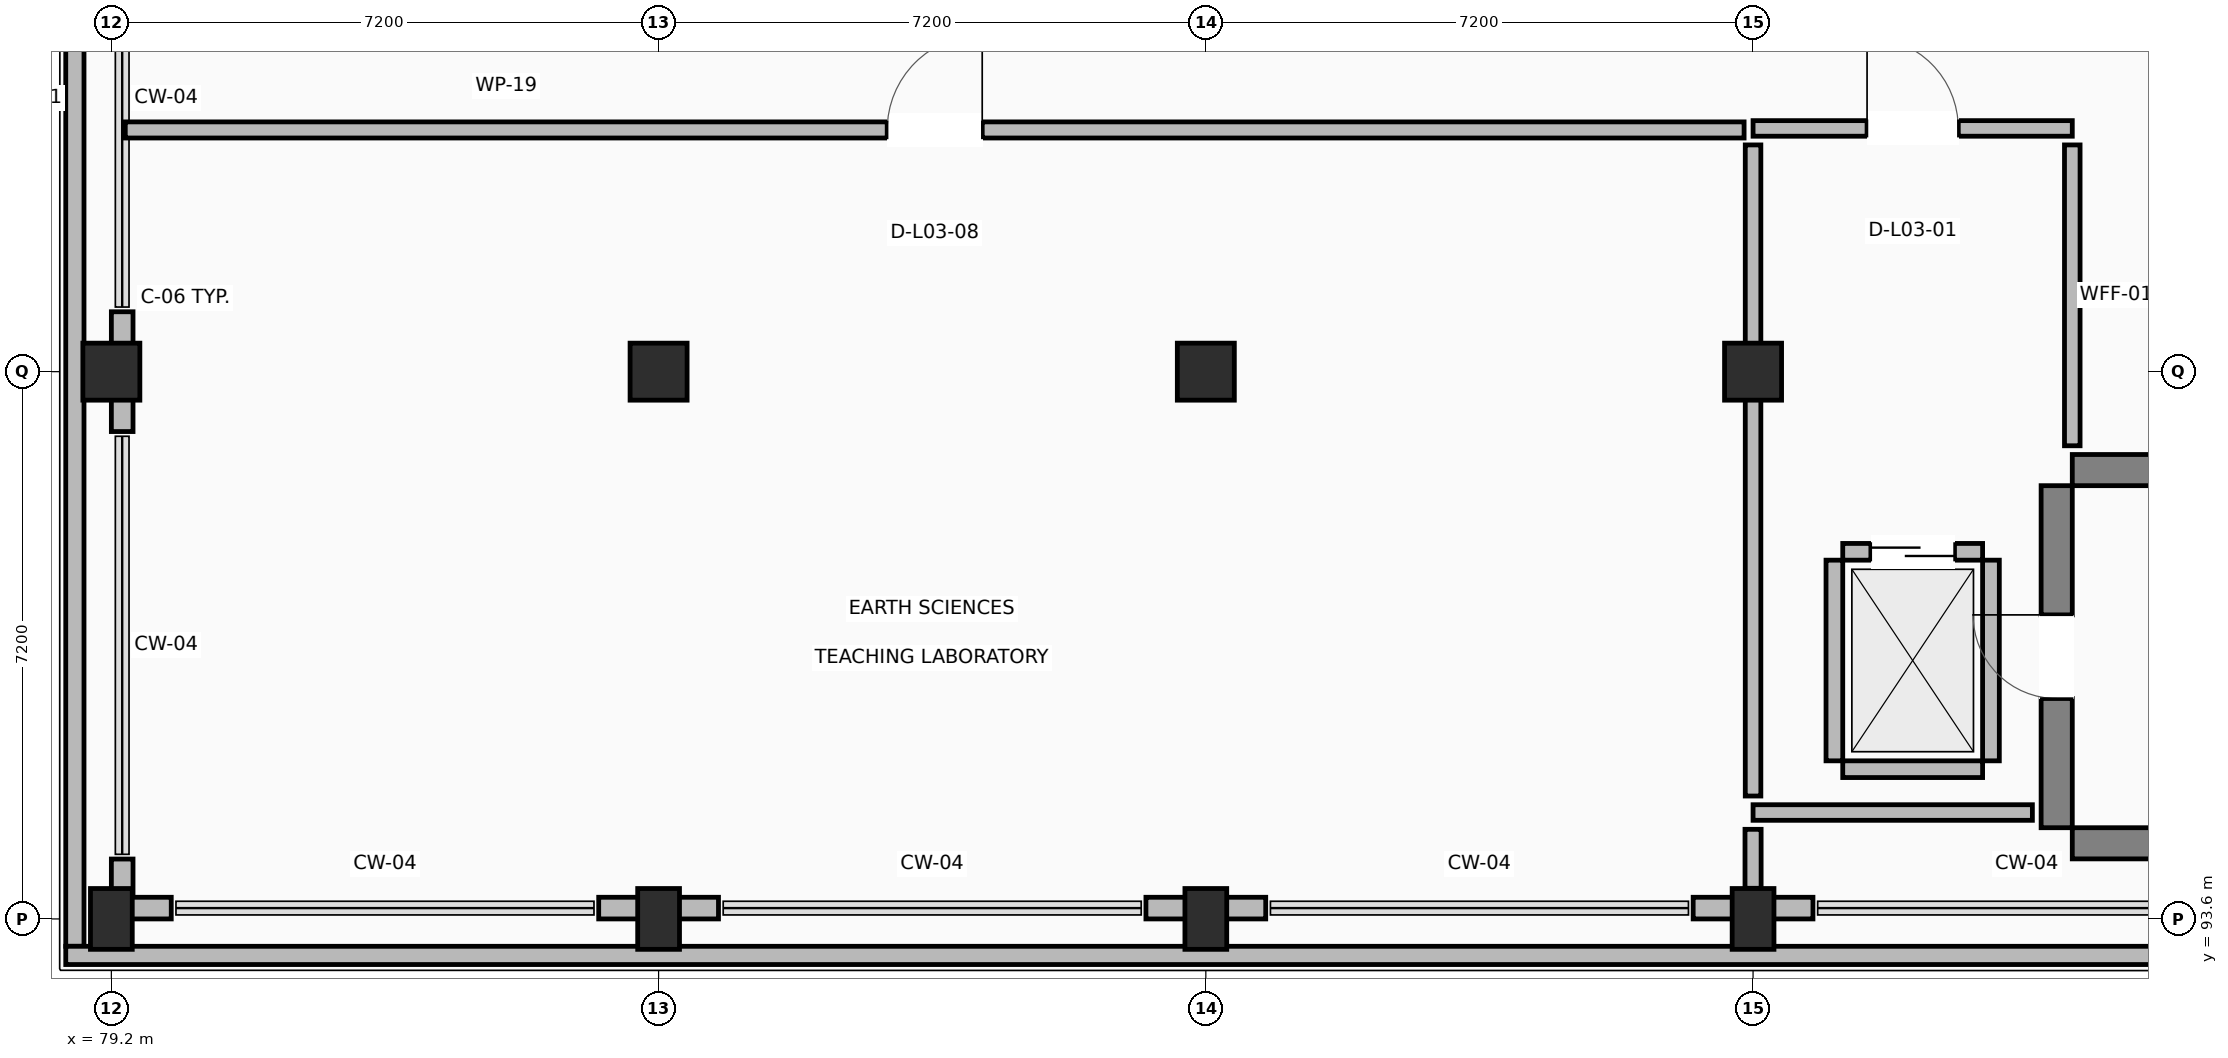
"""IFC4 building model, lengths in metres.
Left out: names, types, materials, properties, quantities, classifications, styles, units other than length and angle.
Written with IfcOpenShell. Run it as: python <this file> out.ifc"""

import sys

from ifc_helpers import new_model, si_unit, direction, frame, frame_2d, origin, origin_2d, place, context, subcontext, project, spatial, rectangle, extrude, element, fill, save


model = new_model("IFC4")
c1 = context("Model", 3, precision=1e-05, world=origin(), true_north=direction((0.0, 1.0)))
c2 = subcontext(c1, "Body", "Model", "MODEL_VIEW")
j1 = project(units=[si_unit("LENGTHUNIT", "METRE"), si_unit("PLANEANGLEUNIT", "RADIAN")], contexts=[c1])
p1 = place(None, origin())
s1 = spatial("IfcSite", under=j1, at=p1, CompositionType="ELEMENT")
p2 = place(p1, origin())
s2 = spatial("IfcBuilding", under=s1, at=p2, CompositionType="ELEMENT")
p3 = place(p2, frame((0.0, 0.0, 13.5)))
s3 = spatial("IfcBuildingStorey", under=s2, at=p3, CompositionType="ELEMENT", Elevation=13.5)
p4 = place(p3, frame((79.2, 93.6, 0.0), z_axis=(0.0, 0.0, 1.0), x_axis=(1.0, 0.0, 0.0)))
e1 = element("IfcColumn", 1, at=p4, inside=s3, PredefinedType="COLUMN", context=c2, shape_type="SweptSolid", body=[
    extrude(rectangle(XDim=0.55, YDim=0.8, at=origin_2d()), origin(), (0.0, 0.0, 1.0), 4.22),
])
p5 = place(p3, frame((79.2, 100.8, 0.0), z_axis=(0.0, 0.0, 1.0), x_axis=(1.0, 0.0, 0.0)))
e2 = element("IfcColumn", 2, at=p5, inside=s3, PredefinedType="COLUMN", context=c2, shape_type="SweptSolid", body=[
    extrude(rectangle(XDim=0.75, YDim=0.75, at=origin_2d()), origin(), (0.0, 0.0, 1.0), 4.22),
])
p6 = place(p3, frame((86.4, 93.6, 0.0), z_axis=(0.0, 0.0, 1.0), x_axis=(1.0, 0.0, 0.0)))
e3 = element("IfcColumn", 3, at=p6, inside=s3, PredefinedType="COLUMN", context=c2, shape_type="SweptSolid", body=[
    extrude(rectangle(XDim=0.55, YDim=0.8, at=origin_2d()), origin(), (0.0, 0.0, 1.0), 4.22),
])
p7 = place(p3, frame((86.4, 100.8, 0.0), z_axis=(0.0, 0.0, 1.0), x_axis=(1.0, 0.0, 0.0)))
e4 = element("IfcColumn", 4, at=p7, inside=s3, PredefinedType="COLUMN", context=c2, shape_type="SweptSolid", body=[
    extrude(rectangle(XDim=0.75, YDim=0.75, at=origin_2d()), origin(), (0.0, 0.0, 1.0), 4.22),
])
p8 = place(p3, frame((93.6, 93.6, 0.0), z_axis=(0.0, 0.0, 1.0), x_axis=(1.0, 0.0, 0.0)))
e5 = element("IfcColumn", 5, at=p8, inside=s3, PredefinedType="COLUMN", context=c2, shape_type="SweptSolid", body=[
    extrude(rectangle(XDim=0.55, YDim=0.8, at=origin_2d()), origin(), (0.0, 0.0, 1.0), 4.22),
])
p9 = place(p3, frame((93.6, 100.8, 0.0), z_axis=(0.0, 0.0, 1.0), x_axis=(1.0, 0.0, 0.0)))
e6 = element("IfcColumn", 6, at=p9, inside=s3, PredefinedType="COLUMN", context=c2, shape_type="SweptSolid", body=[
    extrude(rectangle(XDim=0.75, YDim=0.75, at=origin_2d()), origin(), (0.0, 0.0, 1.0), 4.22),
])
p10 = place(p3, frame((100.8, 93.6, 0.0), z_axis=(0.0, 0.0, 1.0), x_axis=(1.0, 0.0, 0.0)))
e7 = element("IfcColumn", 7, at=p10, inside=s3, PredefinedType="COLUMN", context=c2, shape_type="SweptSolid", body=[
    extrude(rectangle(XDim=0.55, YDim=0.8, at=origin_2d()), origin(), (0.0, 0.0, 1.0), 4.22),
])
p11 = place(p3, frame((100.8, 100.8, 0.0), z_axis=(0.0, 0.0, 1.0), x_axis=(1.0, 0.0, 0.0)))
e8 = element("IfcColumn", 8, at=p11, inside=s3, PredefinedType="COLUMN", context=c2, shape_type="SweptSolid", body=[
    extrude(rectangle(XDim=0.75, YDim=0.75, at=origin_2d()), origin(), (0.0, 0.0, 1.0), 4.22),
])
for number, where, z_axis, x_axis in (
    (9, (105.0, 94.595, 0.0), (0.0, 0.0, 1.0), (1.0, 0.0, 0.0)),
    (10, (105.0, 99.505, 0.0), (0.0, 0.0, 1.0), (1.0, 0.0, 0.0)),
):
    element("IfcWall", number, at=place(p3, frame(where, z_axis=z_axis, x_axis=x_axis)), inside=s3, PredefinedType="SHEAR", context=c2, shape_type="SweptSolid", body=[
        extrude(rectangle(XDim=9.5, YDim=0.41, at=frame_2d((4.75, 0.0))), origin(), (0.0, 0.0, 1.0), 4.22),
    ])
p12 = place(p3, frame((104.795, 94.8, 0.0), z_axis=(0.0, 0.0, 1.0), x_axis=(0.0, 1.0, 0.0)))
e11 = element("IfcWall", 11, at=p12, inside=s3, PredefinedType="SHEAR", context=c2, shape_type="SweptSolid", body=[
    extrude(rectangle(XDim=4.5, YDim=0.41, at=frame_2d((2.25, 0.0))), origin(), (0.0, 0.0, 1.0), 4.22),
])
p13 = place(p12, frame((1.7, 0.0, 0.0)))
e12 = element("IfcOpeningElement", 12, at=p13, cuts=e11, PredefinedType="OPENING", context=c2, shape_type="SweptSolid", body=[
    extrude(rectangle(XDim=1.1, YDim=2.15, at=frame_2d((0.55, 1.075))), frame((0.0, 0.215, 0.0), z_axis=(0.0, -1.0, 0.0), x_axis=(1.0, 0.0, 0.0)), (0.0, 0.0, 1.0), 0.43),
])
p14 = place(p3, frame((79.343, 101.588, 0.0), z_axis=(0.0, 0.0, 1.0), x_axis=(0.0, -1.0, 0.0)))
e13 = element("IfcWall", 13, at=p14, inside=s3, PredefinedType="STANDARD", context=c2, shape_type="SweptSolid", body=[
    extrude(rectangle(XDim=1.576, YDim=0.285, at=frame_2d((0.788, 0.0))), origin(), (0.0, 0.0, 1.0), 3.26),
])
p15 = place(p3, frame((79.343, 94.388, 0.0), z_axis=(0.0, 0.0, 1.0), x_axis=(0.0, -1.0, 0.0)))
e14 = element("IfcWall", 14, at=p15, inside=s3, PredefinedType="STANDARD", context=c2, shape_type="SweptSolid", body=[
    extrude(rectangle(XDim=0.503, YDim=0.285, at=frame_2d((0.251, 0.0))), origin(), (0.0, 0.0, 1.0), 3.26),
])
p16 = place(p3, frame((79.2, 93.742, 0.0), z_axis=(0.0, 0.0, 1.0), x_axis=(1.0, 0.0, 0.0)))
e15 = element("IfcWall", 15, at=p16, inside=s3, PredefinedType="STANDARD", context=c2, shape_type="SweptSolid", body=[
    extrude(rectangle(XDim=0.788, YDim=0.285, at=frame_2d((0.394, 0.0))), origin(), (0.0, 0.0, 1.0), 3.26),
])
for number, where, z_axis, x_axis in (
    (16, (85.612, 93.742, 0.0), (0.0, 0.0, 1.0), (1.0, 0.0, 0.0)),
    (17, (92.812, 93.742, 0.0), (0.0, 0.0, 1.0), (1.0, 0.0, 0.0)),
    (18, (100.012, 93.742, 0.0), (0.0, 0.0, 1.0), (1.0, 0.0, 0.0)),
):
    element("IfcWall", number, at=place(p3, frame(where, z_axis=z_axis, x_axis=x_axis)), inside=s3, PredefinedType="STANDARD", context=c2, shape_type="SweptSolid", body=[
        extrude(rectangle(XDim=1.576, YDim=0.285, at=frame_2d((0.788, 0.0))), origin(), (0.0, 0.0, 1.0), 3.26),
    ])
p17 = place(p3, frame((78.72, 93.24, 0.0), z_axis=(0.0, 0.0, 1.0), x_axis=(0.0, 1.0, 0.0)))
e19 = element("IfcWall", 19, at=p17, inside=s3, PredefinedType="PARAPET", context=c2, shape_type="SweptSolid", body=[
    extrude(rectangle(XDim=22.32, YDim=0.24, at=frame_2d((11.16, 0.0))), origin(), (0.0, 0.0, 1.0), 1.12),
])
p18 = place(p3, frame((136.44, 93.12, 0.0), z_axis=(0.0, 0.0, 1.0), x_axis=(-1.0, 0.0, 0.0)))
e20 = element("IfcWall", 20, at=p18, inside=s3, PredefinedType="PARAPET", context=c2, shape_type="SweptSolid", body=[
    extrude(rectangle(XDim=57.84, YDim=0.24, at=frame_2d((28.92, 0.0))), origin(), (0.0, 0.0, 1.0), 1.12),
])
p19 = place(p3, frame((101.98, 95.57, 0.0), z_axis=(0.0, 0.0, 1.0), x_axis=(1.0, 0.0, 0.0)))
e21 = element("IfcWall", 21, at=p19, inside=s3, PredefinedType="STANDARD", context=c2, shape_type="SweptSolid", body=[
    extrude(rectangle(XDim=1.84, YDim=0.22, at=frame_2d((0.92, 0.0))), origin(), (0.0, 0.0, 1.0), 3.26),
])
p20 = place(p3, frame((101.98, 98.43, 0.0), z_axis=(0.0, 0.0, 1.0), x_axis=(1.0, 0.0, 0.0)))
e22 = element("IfcWall", 22, at=p20, inside=s3, PredefinedType="STANDARD", context=c2, shape_type="SweptSolid", body=[
    extrude(rectangle(XDim=1.84, YDim=0.22, at=frame_2d((0.92, 0.0))), origin(), (0.0, 0.0, 1.0), 3.26),
])
p21 = place(p20, frame((0.37, 0.0, 0.0)))
e23 = element("IfcOpeningElement", 23, at=p21, cuts=e22, PredefinedType="OPENING", context=c2, shape_type="SweptSolid", body=[
    extrude(rectangle(XDim=1.1, YDim=2.15, at=frame_2d((0.55, 1.075))), frame((0.0, 0.12, 0.0), z_axis=(0.0, -1.0, 0.0), x_axis=(1.0, 0.0, 0.0)), (0.0, 0.0, 1.0), 0.24),
])
for number, where, z_axis, x_axis in (
    (24, (101.87, 95.68, 0.0), (0.0, 0.0, 1.0), (0.0, 1.0, 0.0)),
    (25, (103.93, 95.68, 0.0), (0.0, 0.0, 1.0), (0.0, 1.0, 0.0)),
):
    element("IfcWall", number, at=place(p3, frame(where, z_axis=z_axis, x_axis=x_axis)), inside=s3, PredefinedType="STANDARD", context=c2, shape_type="SweptSolid", body=[
        extrude(rectangle(XDim=2.64, YDim=0.22, at=frame_2d((1.32, 0.0))), origin(), (0.0, 0.0, 1.0), 3.26),
    ])
p22 = place(p3, frame((100.8, 104.0, 0.0), z_axis=(0.0, 0.0, 1.0), x_axis=(1.0, 0.0, 0.0)))
e26 = element("IfcWall", 26, at=p22, inside=s3, PredefinedType="PARTITIONING", context=c2, shape_type="SweptSolid", body=[
    extrude(rectangle(XDim=4.2, YDim=0.205, at=frame_2d((2.1, 0.0))), origin(), (0.0, 0.0, 1.0), 3.26),
])
p23 = place(p22, frame((1.5, 0.0, 0.0)))
e27 = element("IfcOpeningElement", 27, at=p23, cuts=e26, PredefinedType="OPENING", context=c2, shape_type="SweptSolid", body=[
    extrude(rectangle(XDim=1.2, YDim=2.15, at=frame_2d((0.6, 1.075))), frame((0.0, 0.113, 0.0), z_axis=(0.0, -1.0, 0.0), x_axis=(1.0, 0.0, 0.0)), (0.0, 0.0, 1.0), 0.225),
])
p24 = place(p3, frame((105.0, 103.783, 0.0), z_axis=(0.0, 0.0, 1.0), x_axis=(0.0, -1.0, 0.0)))
e28 = element("IfcWall", 28, at=p24, inside=s3, PredefinedType="PARTITIONING", context=c2, shape_type="SweptSolid", body=[
    extrude(rectangle(XDim=3.958, YDim=0.205, at=frame_2d((1.979, 0.0))), origin(), (0.0, 0.0, 1.0), 3.26),
])
p25 = place(p3, frame((104.475, 95.0, 0.0), z_axis=(0.0, 0.0, 1.0), x_axis=(-1.0, 0.0, 0.0)))
e29 = element("IfcWall", 29, at=p25, inside=s3, PredefinedType="PARTITIONING", context=c2, shape_type="SweptSolid", body=[
    extrude(rectangle(XDim=3.675, YDim=0.205, at=frame_2d((1.837, 0.0))), origin(), (0.0, 0.0, 1.0), 3.26),
])
p26 = place(p3, frame((100.8, 95.217, 0.0), z_axis=(0.0, 0.0, 1.0), x_axis=(0.0, 1.0, 0.0)))
e30 = element("IfcWall", 30, at=p26, inside=s3, PredefinedType="PARTITIONING", context=c2, shape_type="SweptSolid", body=[
    extrude(rectangle(XDim=8.566, YDim=0.205, at=frame_2d((4.283, 0.0))), origin(), (0.0, 0.0, 1.0), 3.26),
])
p27 = place(p3, frame((79.383, 103.98, 0.0), z_axis=(0.0, 0.0, 1.0), x_axis=(1.0, 0.0, 0.0)))
e31 = element("IfcWall", 31, at=p27, inside=s3, PredefinedType="PARTITIONING", context=c2, shape_type="SweptSolid", body=[
    extrude(rectangle(XDim=21.299, YDim=0.212, at=frame_2d((10.649, 0.0))), origin(), (0.0, 0.0, 1.0), 3.26),
])
p28 = place(p27, frame((10.025, 0.0, 0.0)))
e32 = element("IfcOpeningElement", 32, at=p28, cuts=e31, PredefinedType="OPENING", context=c2, shape_type="SweptSolid", body=[
    extrude(rectangle(XDim=1.25, YDim=2.15, at=frame_2d((0.625, 1.075))), frame((0.0, 0.116, 0.0), z_axis=(0.0, -1.0, 0.0), x_axis=(1.0, 0.0, 0.0)), (0.0, 0.0, 1.0), 0.232),
])
p29 = place(p3, frame((100.8, 94.779, 0.0), z_axis=(0.0, 0.0, 1.0), x_axis=(0.0, -1.0, 0.0)))
e33 = element("IfcWall", 33, at=p29, inside=s3, PredefinedType="PARTITIONING", context=c2, shape_type="SweptSolid", body=[
    extrude(rectangle(XDim=0.776, YDim=0.212, at=frame_2d((0.388, 0.0))), origin(), (0.0, 0.0, 1.0), 3.26),
])
p30 = place(p13, origin())
e34 = element("IfcDoor", 34, at=p30, inside=s3, OperationType="SINGLE_SWING_RIGHT", PredefinedType="DOOR", context=c2, shape_type="SweptSolid", body=[
    extrude(rectangle(XDim=1.1, YDim=2.15, at=frame_2d((0.55, 1.075))), frame((0.0, 0.025, 0.0), z_axis=(0.0, -1.0, 0.0), x_axis=(1.0, 0.0, 0.0)), (0.0, 0.0, 1.0), 0.05),
])
fill(e12, e34)
p31 = place(p21, origin())
e35 = element("IfcDoor", 35, at=p31, inside=s3, OperationType="SLIDING_TO_RIGHT", PredefinedType="DOOR", context=c2, shape_type="SweptSolid", body=[
    extrude(rectangle(XDim=1.1, YDim=2.15, at=frame_2d((0.55, 1.075))), frame((0.0, 0.025, 0.0), z_axis=(0.0, -1.0, 0.0), x_axis=(1.0, 0.0, 0.0)), (0.0, 0.0, 1.0), 0.05),
])
fill(e23, e35)
p32 = place(p23, origin())
e36 = element("IfcDoor", 36, at=p32, inside=s3, OperationType="SINGLE_SWING_LEFT", PredefinedType="DOOR", context=c2, shape_type="SweptSolid", body=[
    extrude(rectangle(XDim=1.2, YDim=2.15, at=frame_2d((0.6, 1.075))), frame((0.0, 0.025, 0.0), z_axis=(0.0, -1.0, 0.0), x_axis=(1.0, 0.0, 0.0)), (0.0, 0.0, 1.0), 0.05),
])
fill(e27, e36)
p33 = place(p28, origin())
e37 = element("IfcDoor", 37, at=p33, inside=s3, OperationType="SINGLE_SWING_RIGHT", PredefinedType="DOOR", context=c2, shape_type="SweptSolid", body=[
    extrude(rectangle(XDim=1.25, YDim=2.15, at=frame_2d((0.625, 1.075))), frame((0.0, 0.025, 0.0), z_axis=(0.0, -1.0, 0.0), x_axis=(1.0, 0.0, 0.0)), (0.0, 0.0, 1.0), 0.05),
])
fill(e32, e37)
save(model, sys.argv[1])
